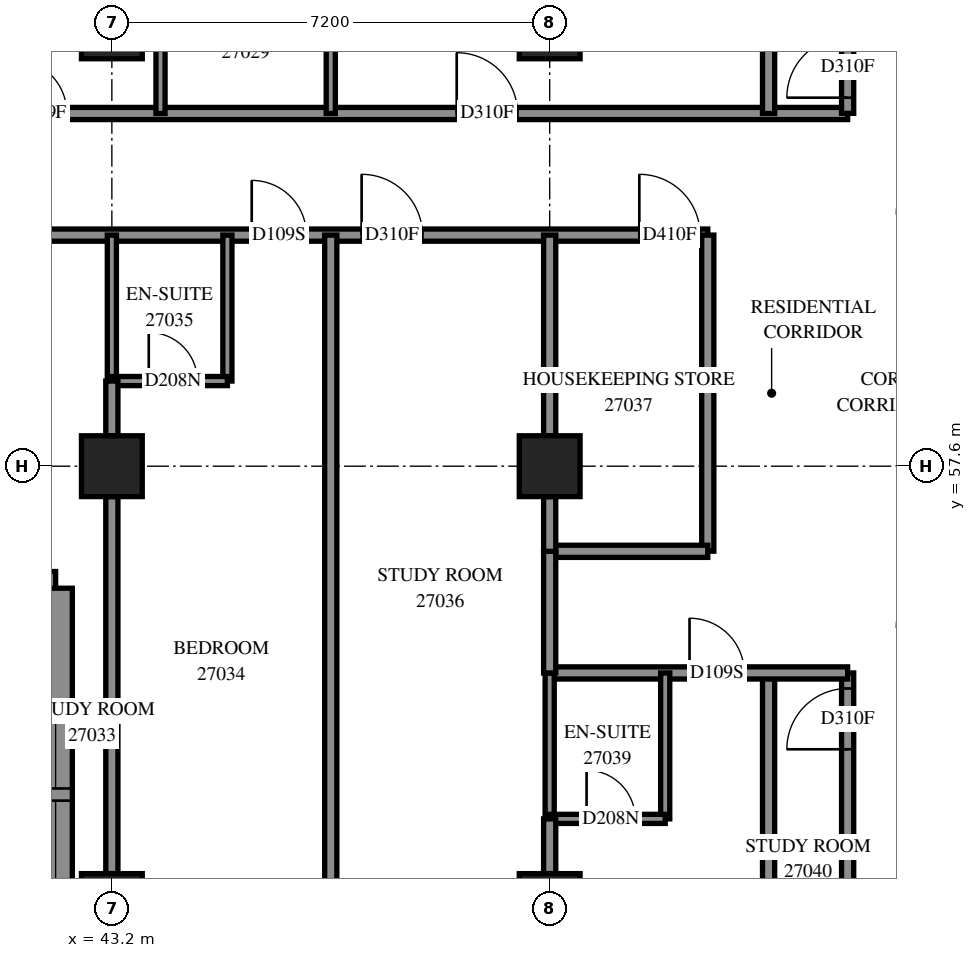
"""IFC4 building model, lengths in metres.
Left out: names, types, materials, properties, quantities, classifications, styles, units other than length and angle.
Written with IfcOpenShell. Run it as: python <this file> out.ifc"""

import sys

from ifc_helpers import new_model, si_unit, direction, frame, frame_2d, origin, origin_2d, place, context, subcontext, project, spatial, polyline, rectangle, outline, extrude, element, fill, save


model = new_model("IFC4")
c1 = context("Model", 3, precision=1e-05, world=origin(), true_north=direction((0.0, 1.0)))
c2 = subcontext(c1, "Body", "Model", "MODEL_VIEW")
j1 = project(units=[si_unit("LENGTHUNIT", "METRE"), si_unit("PLANEANGLEUNIT", "RADIAN")], contexts=[c1])
p1 = place(None, origin())
s1 = spatial("IfcSite", under=j1, at=p1, CompositionType="ELEMENT")
p2 = place(p1, origin())
s2 = spatial("IfcBuilding", under=s1, at=p2, CompositionType="ELEMENT")
p3 = place(p2, frame((0.0, 0.0, 101.6)))
s3 = spatial("IfcBuildingStorey", under=s2, at=p3, CompositionType="ELEMENT", Elevation=101.6)
for number, where, z_axis, x_axis in (
    (1, (43.2, 50.4, 0.0), (0.0, 0.0, 1.0), (1.0, 0.0, 0.0)),
    (2, (43.2, 57.6, 0.0), (0.0, 0.0, 1.0), (1.0, 0.0, 0.0)),
    (3, (43.2, 64.8, 0.0), (0.0, 0.0, 1.0), (1.0, 0.0, 0.0)),
    (4, (50.4, 50.4, 0.0), (0.0, 0.0, 1.0), (1.0, 0.0, 0.0)),
    (5, (50.4, 57.6, 0.0), (0.0, 0.0, 1.0), (1.0, 0.0, 0.0)),
    (6, (50.4, 64.8, 0.0), (0.0, 0.0, 1.0), (1.0, 0.0, 0.0)),
):
    element("IfcColumn", number, at=place(p3, frame(where, z_axis=z_axis, x_axis=x_axis)), inside=s3, PredefinedType="COLUMN", context=c2, shape_type="SweptSolid", body=[
        extrude(rectangle(XDim=1.0, YDim=1.0, at=origin_2d()), origin(), (0.0, 0.0, 1.0), 3.1),
    ])
p4 = place(p3, frame((27.875, 55.593, 0.0), z_axis=(0.0, 0.0, 1.0), x_axis=(1.0, 0.0, 0.0)))
e7 = element("IfcWall", 7, at=p4, inside=s3, PredefinedType="SOLIDWALL", context=c2, shape_type="SweptSolid", body=[
    extrude(outline(polyline([(-0.275, -0.275), (14.125, -0.275), (14.675, 0.275), (0.275, 0.275), (-0.275, -0.275)])), origin(), (0.0, 0.0, 1.0), 3.1),
])
p5 = place(p4, frame((1.175, 0.0, 0.5)))
e8 = element("IfcOpeningElement", 8, at=p5, cuts=e7, PredefinedType="OPENING", context=c2, shape_type="SweptSolid", body=[
    extrude(rectangle(XDim=1.3, YDim=2.45, at=frame_2d((0.65, 1.225))), frame((0.0, 0.285, 0.0), z_axis=(0.0, -1.0, 0.0), x_axis=(1.0, 0.0, 0.0)), (0.0, 0.0, 1.0), 0.57),
])
p6 = place(p4, frame((2.675, 0.0, 0.5)))
e9 = element("IfcOpeningElement", 9, at=p6, cuts=e7, PredefinedType="OPENING", context=c2, shape_type="SweptSolid", body=[
    extrude(rectangle(XDim=1.3, YDim=2.45, at=frame_2d((0.65, 1.225))), frame((0.0, 0.285, 0.0), z_axis=(0.0, -1.0, 0.0), x_axis=(1.0, 0.0, 0.0)), (0.0, 0.0, 1.0), 0.57),
])
p7 = place(p4, frame((4.925, 0.0, 0.5)))
e10 = element("IfcOpeningElement", 10, at=p7, cuts=e7, PredefinedType="OPENING", context=c2, shape_type="SweptSolid", body=[
    extrude(rectangle(XDim=1.3, YDim=2.45, at=frame_2d((0.65, 1.225))), frame((0.0, 0.285, 0.0), z_axis=(0.0, -1.0, 0.0), x_axis=(1.0, 0.0, 0.0)), (0.0, 0.0, 1.0), 0.57),
])
p8 = place(p4, frame((6.425, 0.0, 0.5)))
e11 = element("IfcOpeningElement", 11, at=p8, cuts=e7, PredefinedType="OPENING", context=c2, shape_type="SweptSolid", body=[
    extrude(rectangle(XDim=1.3, YDim=2.45, at=frame_2d((0.65, 1.225))), frame((0.0, 0.285, 0.0), z_axis=(0.0, -1.0, 0.0), x_axis=(1.0, 0.0, 0.0)), (0.0, 0.0, 1.0), 0.57),
])
p9 = place(p4, frame((8.275, 0.0, 0.5)))
e12 = element("IfcOpeningElement", 12, at=p9, cuts=e7, PredefinedType="OPENING", context=c2, shape_type="SweptSolid", body=[
    extrude(rectangle(XDim=1.3, YDim=2.45, at=frame_2d((0.65, 1.225))), frame((0.0, 0.285, 0.0), z_axis=(0.0, -1.0, 0.0), x_axis=(1.0, 0.0, 0.0)), (0.0, 0.0, 1.0), 0.57),
])
p10 = place(p4, frame((9.775, 0.0, 0.5)))
e13 = element("IfcOpeningElement", 13, at=p10, cuts=e7, PredefinedType="OPENING", context=c2, shape_type="SweptSolid", body=[
    extrude(rectangle(XDim=1.3, YDim=2.45, at=frame_2d((0.65, 1.225))), frame((0.0, 0.285, 0.0), z_axis=(0.0, -1.0, 0.0), x_axis=(1.0, 0.0, 0.0)), (0.0, 0.0, 1.0), 0.57),
])
p11 = place(p4, frame((12.363, 0.0, 0.5)))
e14 = element("IfcOpeningElement", 14, at=p11, cuts=e7, PredefinedType="OPENING", context=c2, shape_type="SweptSolid", body=[
    extrude(rectangle(XDim=1.2, YDim=2.45, at=frame_2d((0.6, 1.225))), frame((0.0, 0.285, 0.0), z_axis=(0.0, -1.0, 0.0), x_axis=(1.0, 0.0, 0.0)), (0.0, 0.0, 1.0), 0.57),
])
p12 = place(p3, frame((42.275, 55.593, 0.0), z_axis=(0.0, 0.0, 1.0), x_axis=(0.0, -1.0, 0.0)))
e15 = element("IfcWall", 15, at=p12, inside=s3, PredefinedType="SOLIDWALL", context=c2, shape_type="SweptSolid", body=[
    extrude(outline(polyline([(0.275, -0.275), (6.393, -0.275), (5.843, 0.275), (-0.275, 0.275), (0.275, -0.275)])), origin(), (0.0, 0.0, 1.0), 3.1),
])
p13 = place(p12, frame((1.993, 0.0, 0.5)))
e16 = element("IfcOpeningElement", 16, at=p13, cuts=e15, PredefinedType="OPENING", context=c2, shape_type="SweptSolid", body=[
    extrude(rectangle(XDim=1.3, YDim=2.45, at=frame_2d((0.65, 1.225))), frame((0.0, 0.285, 0.0), z_axis=(0.0, -1.0, 0.0), x_axis=(1.0, 0.0, 0.0)), (0.0, 0.0, 1.0), 0.57),
])
p14 = place(p12, frame((3.493, 0.0, 0.5)))
e17 = element("IfcOpeningElement", 17, at=p14, cuts=e15, PredefinedType="OPENING", context=c2, shape_type="SweptSolid", body=[
    extrude(rectangle(XDim=1.3, YDim=2.45, at=frame_2d((0.65, 1.225))), frame((0.0, 0.285, 0.0), z_axis=(0.0, -1.0, 0.0), x_axis=(1.0, 0.0, 0.0)), (0.0, 0.0, 1.0), 0.57),
])
p15 = place(p3, frame((28.8, 61.4, 0.0), z_axis=(0.0, 0.0, 1.0), x_axis=(1.0, 0.0, 0.0)))
e18 = element("IfcWall", 18, at=p15, inside=s3, PredefinedType="PARTITIONING", context=c2, shape_type="SweptSolid", body=[
    extrude(rectangle(XDim=24.2, YDim=0.2, at=frame_2d((12.1, 0.0))), origin(), (0.0, 0.0, 1.0), 3.1),
])
p16 = place(p15, frame((2.3, 0.0, 0.0)))
e19 = element("IfcOpeningElement", 19, at=p16, cuts=e18, PredefinedType="OPENING", context=c2, shape_type="SweptSolid", body=[
    extrude(rectangle(XDim=0.9, YDim=2.1, at=frame_2d((0.45, 1.05))), frame((0.0, 0.11, 0.0), z_axis=(0.0, -1.0, 0.0), x_axis=(1.0, 0.0, 0.0)), (0.0, 0.0, 1.0), 0.22),
])
p17 = place(p15, frame((5.901, 0.0, 0.0)))
e20 = element("IfcOpeningElement", 20, at=p17, cuts=e18, PredefinedType="OPENING", context=c2, shape_type="SweptSolid", body=[
    extrude(rectangle(XDim=0.9, YDim=2.1, at=frame_2d((0.45, 1.05))), frame((0.0, 0.11, 0.0), z_axis=(0.0, -1.0, 0.0), x_axis=(1.0, 0.0, 0.0)), (0.0, 0.0, 1.0), 0.22),
])
p18 = place(p15, frame((11.307, 0.0, 0.0)))
e21 = element("IfcOpeningElement", 21, at=p18, cuts=e18, PredefinedType="OPENING", context=c2, shape_type="SweptSolid", body=[
    extrude(rectangle(XDim=1.0, YDim=2.1, at=frame_2d((0.5, 1.05))), frame((0.0, 0.11, 0.0), z_axis=(0.0, -1.0, 0.0), x_axis=(1.0, 0.0, 0.0)), (0.0, 0.0, 1.0), 0.22),
])
p19 = place(p15, frame((16.7, 0.0, 0.0)))
e22 = element("IfcOpeningElement", 22, at=p19, cuts=e18, PredefinedType="OPENING", context=c2, shape_type="SweptSolid", body=[
    extrude(rectangle(XDim=0.9, YDim=2.1, at=frame_2d((0.45, 1.05))), frame((0.0, 0.11, 0.0), z_axis=(0.0, -1.0, 0.0), x_axis=(1.0, 0.0, 0.0)), (0.0, 0.0, 1.0), 0.22),
])
p20 = place(p15, frame((18.508, 0.0, 0.0)))
e23 = element("IfcOpeningElement", 23, at=p20, cuts=e18, PredefinedType="OPENING", context=c2, shape_type="SweptSolid", body=[
    extrude(rectangle(XDim=1.0, YDim=2.1, at=frame_2d((0.5, 1.05))), frame((0.0, 0.11, 0.0), z_axis=(0.0, -1.0, 0.0), x_axis=(1.0, 0.0, 0.0)), (0.0, 0.0, 1.0), 0.22),
])
p21 = place(p15, frame((23.074, 0.0, 0.0)))
e24 = element("IfcOpeningElement", 24, at=p21, cuts=e18, PredefinedType="OPENING", context=c2, shape_type="SweptSolid", body=[
    extrude(rectangle(XDim=1.0, YDim=2.1, at=frame_2d((0.5, 1.05))), frame((0.0, 0.11, 0.0), z_axis=(0.0, -1.0, 0.0), x_axis=(1.0, 0.0, 0.0)), (0.0, 0.0, 1.0), 0.22),
])
p22 = place(p3, frame((33.4, 63.4, 0.0), z_axis=(0.0, 0.0, 1.0), x_axis=(1.0, 0.0, 0.0)))
e25 = element("IfcWall", 25, at=p22, inside=s3, PredefinedType="PARTITIONING", context=c2, shape_type="SweptSolid", body=[
    extrude(rectangle(XDim=21.9, YDim=0.2, at=frame_2d((10.95, 0.0))), origin(), (0.0, 0.0, 1.0), 3.1),
])
p23 = place(p22, frame((3.152, 0.0, 0.0)))
e26 = element("IfcOpeningElement", 26, at=p23, cuts=e25, PredefinedType="OPENING", context=c2, shape_type="SweptSolid", body=[
    extrude(rectangle(XDim=0.9, YDim=2.1, at=frame_2d((0.45, 1.05))), frame((0.0, 0.11, 0.0), z_axis=(0.0, -1.0, 0.0), x_axis=(1.0, 0.0, 0.0)), (0.0, 0.0, 1.0), 0.22),
])
p24 = place(p22, frame((8.161, 0.0, 0.0)))
e27 = element("IfcOpeningElement", 27, at=p24, cuts=e25, PredefinedType="OPENING", context=c2, shape_type="SweptSolid", body=[
    extrude(rectangle(XDim=0.9, YDim=2.1, at=frame_2d((0.45, 1.05))), frame((0.0, 0.11, 0.0), z_axis=(0.0, -1.0, 0.0), x_axis=(1.0, 0.0, 0.0)), (0.0, 0.0, 1.0), 0.22),
])
p25 = place(p22, frame((15.471, 0.0, 0.0)))
e28 = element("IfcOpeningElement", 28, at=p25, cuts=e25, PredefinedType="OPENING", context=c2, shape_type="SweptSolid", body=[
    extrude(rectangle(XDim=1.0, YDim=2.1, at=frame_2d((0.5, 1.05))), frame((0.0, 0.11, 0.0), z_axis=(0.0, -1.0, 0.0), x_axis=(1.0, 0.0, 0.0)), (0.0, 0.0, 1.0), 0.22),
])
p26 = place(p3, frame((54.0, 42.36, 0.0), z_axis=(0.0, 0.0, 1.0), x_axis=(0.0, 1.0, 0.0)))
e29 = element("IfcWall", 29, at=p26, inside=s3, PredefinedType="PARTITIONING", context=c2, shape_type="SweptSolid", body=[
    extrude(rectangle(XDim=11.84, YDim=0.2, at=frame_2d((5.92, 0.0))), origin(), (0.0, 0.0, 1.0), 3.1),
])
p27 = place(p3, frame((46.8, 49.75, 0.0), z_axis=(0.0, 0.0, 1.0), x_axis=(0.0, 1.0, 0.0)))
e30 = element("IfcWall", 30, at=p27, inside=s3, PredefinedType="PARTITIONING", context=c2, shape_type="SweptSolid", body=[
    extrude(rectangle(XDim=11.65, YDim=0.2, at=frame_2d((5.825, 0.0))), origin(), (0.0, 0.0, 1.0), 3.1),
])
p28 = place(p3, frame((54.0, 63.4, 0.0), z_axis=(0.0, 0.0, 1.0), x_axis=(0.0, 1.0, 0.0)))
e31 = element("IfcWall", 31, at=p28, inside=s3, PredefinedType="PARTITIONING", context=c2, shape_type="SweptSolid", body=[
    extrude(rectangle(XDim=9.305, YDim=0.2, at=frame_2d((4.652, 0.0))), origin(), (0.0, 0.0, 1.0), 3.1),
])
p29 = place(p3, frame((43.2, 50.9, 0.0), z_axis=(0.0, 0.0, 1.0), x_axis=(0.0, 1.0, 0.0)))
e32 = element("IfcWall", 32, at=p29, inside=s3, PredefinedType="PARTITIONING", context=c2, shape_type="SweptSolid", body=[
    extrude(rectangle(XDim=6.2, YDim=0.2, at=frame_2d((3.1, 0.0))), origin(), (0.0, 0.0, 1.0), 2.6),
])
p30 = place(p3, frame((55.3, 48.1, 0.0), z_axis=(0.0, 0.0, 1.0), x_axis=(0.0, 1.0, 0.0)))
e33 = element("IfcWall", 33, at=p30, inside=s3, PredefinedType="PARTITIONING", context=c2, shape_type="SweptSolid", body=[
    extrude(rectangle(XDim=6.1, YDim=0.2, at=frame_2d((3.05, 0.0))), origin(), (0.0, 0.0, 1.0), 3.1),
])
p31 = place(p30, frame((4.845, 0.0, 0.0)))
e34 = element("IfcOpeningElement", 34, at=p31, cuts=e33, PredefinedType="OPENING", context=c2, shape_type="SweptSolid", body=[
    extrude(rectangle(XDim=1.0, YDim=2.1, at=frame_2d((0.5, 1.05))), frame((0.0, 0.11, 0.0), z_axis=(0.0, -1.0, 0.0), x_axis=(1.0, 0.0, 0.0)), (0.0, 0.0, 1.0), 0.22),
])
p32 = place(p3, frame((53.0, 56.202, 0.0), z_axis=(0.0, 0.0, 1.0), x_axis=(0.0, 1.0, 0.0)))
e35 = element("IfcWall", 35, at=p32, inside=s3, PredefinedType="PARTITIONING", context=c2, shape_type="SweptSolid", body=[
    extrude(rectangle(XDim=5.198, YDim=0.2, at=frame_2d((2.599, 0.0))), origin(), (0.0, 0.0, 1.0), 3.1),
])
p33 = place(p3, frame((50.4, 54.2, 0.0), z_axis=(0.0, 0.0, 1.0), x_axis=(1.0, 0.0, 0.0)))
e36 = element("IfcWall", 36, at=p33, inside=s3, PredefinedType="PARTITIONING", context=c2, shape_type="SweptSolid", body=[
    extrude(rectangle(XDim=4.9, YDim=0.2, at=frame_2d((2.45, 0.0))), origin(), (0.0, 0.0, 1.0), 3.1),
])
p34 = place(p33, frame((2.3, 0.0, 0.0)))
e37 = element("IfcOpeningElement", 37, at=p34, cuts=e36, PredefinedType="OPENING", context=c2, shape_type="SweptSolid", body=[
    extrude(rectangle(XDim=0.9, YDim=2.1, at=frame_2d((0.45, 1.05))), frame((0.0, 0.11, 0.0), z_axis=(0.0, -1.0, 0.0), x_axis=(1.0, 0.0, 0.0)), (0.0, 0.0, 1.0), 0.22),
])
p35 = place(p3, frame((55.3, 63.402, 0.0), z_axis=(0.0, 0.0, 1.0), x_axis=(0.0, 1.0, 0.0)))
e38 = element("IfcWall", 38, at=p35, inside=s3, PredefinedType="PARTITIONING", context=c2, shape_type="SweptSolid", body=[
    extrude(rectangle(XDim=3.698, YDim=0.2, at=frame_2d((1.849, 0.0))), origin(), (0.0, 0.0, 1.0), 3.1),
])
p36 = place(p35, frame((0.258, 0.0, 0.0)))
e39 = element("IfcOpeningElement", 39, at=p36, cuts=e38, PredefinedType="OPENING", context=c2, shape_type="SweptSolid", body=[
    extrude(rectangle(XDim=1.0, YDim=2.1, at=frame_2d((0.5, 1.05))), frame((0.0, 0.11, 0.0), z_axis=(0.0, -1.0, 0.0), x_axis=(1.0, 0.0, 0.0)), (0.0, 0.0, 1.0), 0.22),
])
p37 = place(p3, frame((50.4, 58.1, 0.0), z_axis=(0.0, 0.0, 1.0), x_axis=(0.0, 1.0, 0.0)))
e40 = element("IfcWall", 40, at=p37, inside=s3, PredefinedType="PARTITIONING", context=c2, shape_type="SweptSolid", body=[
    extrude(rectangle(XDim=3.3, YDim=0.2, at=frame_2d((1.65, 0.0))), origin(), (0.0, 0.0, 1.0), 3.1),
])
p38 = place(p3, frame((50.4, 56.2, 0.0), z_axis=(0.0, 0.0, 1.0), x_axis=(1.0, 0.0, 0.0)))
e41 = element("IfcWall", 41, at=p38, inside=s3, PredefinedType="PARTITIONING", context=c2, shape_type="SweptSolid", body=[
    extrude(rectangle(XDim=2.6, YDim=0.2, at=frame_2d((1.3, 0.0))), origin(), (0.0, 0.0, 1.0), 3.1),
])
for number, where, z_axis, x_axis in (
    (42, (52.3, 51.8, 0.0), (0.0, 0.0, 1.0), (0.0, 1.0, 0.0)),
    (43, (50.4, 51.8, 0.0), (0.0, 0.0, 1.0), (0.0, 1.0, 0.0)),
    (44, (45.1, 59.0, 0.0), (0.0, 0.0, 1.0), (0.0, 1.0, 0.0)),
    (45, (43.2, 59.0, 0.0), (0.0, 0.0, 1.0), (0.0, 1.0, 0.0)),
    (46, (44.0, 63.4, 0.0), (0.0, 0.0, 1.0), (0.0, 1.0, 0.0)),
    (47, (46.8, 63.4, 0.0), (0.0, 0.0, 1.0), (0.0, 1.0, 0.0)),
):
    element("IfcWall", number, at=place(p3, frame(where, z_axis=z_axis, x_axis=x_axis)), inside=s3, PredefinedType="PARTITIONING", context=c2, shape_type="SweptSolid", body=[
        extrude(rectangle(XDim=2.4, YDim=0.15, at=frame_2d((1.2, 0.0))), origin(), (0.0, 0.0, 1.0), 3.1),
    ])
p39 = place(p3, frame((50.4, 54.2, 0.0), z_axis=(0.0, 0.0, 1.0), x_axis=(0.0, 1.0, 0.0)))
e48 = element("IfcWall", 48, at=p39, inside=s3, PredefinedType="PARTITIONING", context=c2, shape_type="SweptSolid", body=[
    extrude(rectangle(XDim=2.0, YDim=0.2, at=frame_2d((1.0, 0.0))), origin(), (0.0, 0.0, 1.0), 3.1),
])
p40 = place(p3, frame((43.2, 59.0, 0.0), z_axis=(0.0, 0.0, 1.0), x_axis=(1.0, 0.0, 0.0)))
e49 = element("IfcWall", 49, at=p40, inside=s3, PredefinedType="PARTITIONING", context=c2, shape_type="SweptSolid", body=[
    extrude(rectangle(XDim=1.9, YDim=0.15, at=frame_2d((0.95, 0.0))), origin(), (0.0, 0.0, 1.0), 3.1),
])
p41 = place(p40, frame((0.607, 0.0, 0.0)))
e50 = element("IfcOpeningElement", 50, at=p41, cuts=e49, PredefinedType="OPENING", context=c2, shape_type="SweptSolid", body=[
    extrude(rectangle(XDim=0.8, YDim=2.1, at=frame_2d((0.4, 1.05))), frame((0.0, 0.085, 0.0), z_axis=(0.0, -1.0, 0.0), x_axis=(1.0, 0.0, 0.0)), (0.0, 0.0, 1.0), 0.17),
])
p42 = place(p3, frame((50.4, 51.8, 0.0), z_axis=(0.0, 0.0, 1.0), x_axis=(1.0, 0.0, 0.0)))
e51 = element("IfcWall", 51, at=p42, inside=s3, PredefinedType="PARTITIONING", context=c2, shape_type="SweptSolid", body=[
    extrude(rectangle(XDim=1.9, YDim=0.15, at=frame_2d((0.95, 0.0))), origin(), (0.0, 0.0, 1.0), 3.1),
])
p43 = place(p42, frame((0.607, 0.0, 0.0)))
e52 = element("IfcOpeningElement", 52, at=p43, cuts=e51, PredefinedType="OPENING", context=c2, shape_type="SweptSolid", body=[
    extrude(rectangle(XDim=0.8, YDim=2.1, at=frame_2d((0.4, 1.05))), frame((0.0, 0.085, 0.0), z_axis=(0.0, -1.0, 0.0), x_axis=(1.0, 0.0, 0.0)), (0.0, 0.0, 1.0), 0.17),
])
for number, where, z_axis, x_axis in (
    (53, (43.2, 58.1, 0.0), (0.0, 0.0, 1.0), (0.0, 1.0, 0.0)),
    (54, (50.4, 50.9, 0.0), (0.0, 0.0, 1.0), (0.0, 1.0, 0.0)),
    (55, (50.4, 56.2, 0.0), (0.0, 0.0, 1.0), (0.0, 1.0, 0.0)),
):
    element("IfcWall", number, at=place(p3, frame(where, z_axis=z_axis, x_axis=x_axis)), inside=s3, PredefinedType="PARTITIONING", context=c2, shape_type="SweptSolid", body=[
        extrude(rectangle(XDim=0.9, YDim=0.2, at=frame_2d((0.45, 0.0))), origin(), (0.0, 0.0, 1.0), 3.1),
    ])
p44 = place(p13, origin())
e56 = element("IfcWindow", 56, at=p44, inside=s3, PartitioningType="SINGLE_PANEL", PredefinedType="WINDOW", context=c2, shape_type="SweptSolid", body=[
    extrude(rectangle(XDim=1.3, YDim=2.45, at=frame_2d((0.65, 1.225))), frame((0.0, 0.155, 0.0), z_axis=(0.0, -1.0, 0.0), x_axis=(1.0, 0.0, 0.0)), (0.0, 0.0, 1.0), 0.06),
])
fill(e16, e56)
p45 = place(p14, origin())
e57 = element("IfcWindow", 57, at=p45, inside=s3, PartitioningType="SINGLE_PANEL", PredefinedType="WINDOW", context=c2, shape_type="SweptSolid", body=[
    extrude(rectangle(XDim=1.3, YDim=2.45, at=frame_2d((0.65, 1.225))), frame((0.0, 0.155, 0.0), z_axis=(0.0, -1.0, 0.0), x_axis=(1.0, 0.0, 0.0)), (0.0, 0.0, 1.0), 0.06),
])
fill(e17, e57)
p46 = place(p24, origin())
e58 = element("IfcDoor", 58, at=p46, inside=s3, OperationType="SINGLE_SWING_LEFT", PredefinedType="DOOR", context=c2, shape_type="SweptSolid", body=[
    extrude(rectangle(XDim=0.9, YDim=2.1, at=frame_2d((0.45, 1.05))), frame((0.0, 0.025, 0.0), z_axis=(0.0, -1.0, 0.0), x_axis=(1.0, 0.0, 0.0)), (0.0, 0.0, 1.0), 0.05),
])
fill(e27, e58)
p47 = place(p25, origin())
e59 = element("IfcDoor", 59, at=p47, inside=s3, OperationType="SINGLE_SWING_LEFT", PredefinedType="DOOR", context=c2, shape_type="SweptSolid", body=[
    extrude(rectangle(XDim=1.0, YDim=2.1, at=frame_2d((0.5, 1.05))), frame((0.0, 0.025, 0.0), z_axis=(0.0, -1.0, 0.0), x_axis=(1.0, 0.0, 0.0)), (0.0, 0.0, 1.0), 0.05),
])
fill(e28, e59)
p48 = place(p36, origin())
e60 = element("IfcDoor", 60, at=p48, inside=s3, OperationType="SINGLE_SWING_LEFT", PredefinedType="DOOR", context=c2, shape_type="SweptSolid", body=[
    extrude(rectangle(XDim=1.0, YDim=2.1, at=frame_2d((0.5, 1.05))), frame((0.0, 0.025, 0.0), z_axis=(0.0, -1.0, 0.0), x_axis=(1.0, 0.0, 0.0)), (0.0, 0.0, 1.0), 0.05),
])
fill(e39, e60)
p49 = place(p19, origin())
e61 = element("IfcDoor", 61, at=p49, inside=s3, OperationType="SINGLE_SWING_LEFT", PredefinedType="DOOR", context=c2, shape_type="SweptSolid", body=[
    extrude(rectangle(XDim=0.9, YDim=2.1, at=frame_2d((0.45, 1.05))), frame((0.0, 0.025, 0.0), z_axis=(0.0, -1.0, 0.0), x_axis=(1.0, 0.0, 0.0)), (0.0, 0.0, 1.0), 0.05),
])
fill(e22, e61)
p50 = place(p41, origin())
e62 = element("IfcDoor", 62, at=p50, inside=s3, OperationType="SINGLE_SWING_RIGHT", PredefinedType="DOOR", context=c2, shape_type="SweptSolid", body=[
    extrude(rectangle(XDim=0.8, YDim=2.1, at=frame_2d((0.4, 1.05))), frame((0.0, 0.025, 0.0), z_axis=(0.0, -1.0, 0.0), x_axis=(1.0, 0.0, 0.0)), (0.0, 0.0, 1.0), 0.05),
])
fill(e50, e62)
p51 = place(p20, origin())
e63 = element("IfcDoor", 63, at=p51, inside=s3, OperationType="SINGLE_SWING_RIGHT", PredefinedType="DOOR", context=c2, shape_type="SweptSolid", body=[
    extrude(rectangle(XDim=1.0, YDim=2.1, at=frame_2d((0.5, 1.05))), frame((0.0, 0.025, 0.0), z_axis=(0.0, -1.0, 0.0), x_axis=(1.0, 0.0, 0.0)), (0.0, 0.0, 1.0), 0.05),
])
fill(e23, e63)
p52 = place(p21, origin())
e64 = element("IfcDoor", 64, at=p52, inside=s3, OperationType="SINGLE_SWING_LEFT", PredefinedType="DOOR", context=c2, shape_type="SweptSolid", body=[
    extrude(rectangle(XDim=1.0, YDim=2.1, at=frame_2d((0.5, 1.05))), frame((0.0, 0.025, 0.0), z_axis=(0.0, -1.0, 0.0), x_axis=(1.0, 0.0, 0.0)), (0.0, 0.0, 1.0), 0.05),
])
fill(e24, e64)
p53 = place(p34, origin())
e65 = element("IfcDoor", 65, at=p53, inside=s3, OperationType="SINGLE_SWING_LEFT", PredefinedType="DOOR", context=c2, shape_type="SweptSolid", body=[
    extrude(rectangle(XDim=0.9, YDim=2.1, at=frame_2d((0.45, 1.05))), frame((0.0, 0.025, 0.0), z_axis=(0.0, -1.0, 0.0), x_axis=(1.0, 0.0, 0.0)), (0.0, 0.0, 1.0), 0.05),
])
fill(e37, e65)
p54 = place(p43, origin())
e66 = element("IfcDoor", 66, at=p54, inside=s3, OperationType="SINGLE_SWING_RIGHT", PredefinedType="DOOR", context=c2, shape_type="SweptSolid", body=[
    extrude(rectangle(XDim=0.8, YDim=2.1, at=frame_2d((0.4, 1.05))), frame((0.0, 0.025, 0.0), z_axis=(0.0, -1.0, 0.0), x_axis=(1.0, 0.0, 0.0)), (0.0, 0.0, 1.0), 0.05),
])
fill(e52, e66)
p55 = place(p31, origin())
e67 = element("IfcDoor", 67, at=p55, inside=s3, OperationType="SINGLE_SWING_RIGHT", PredefinedType="DOOR", context=c2, shape_type="SweptSolid", body=[
    extrude(rectangle(XDim=1.0, YDim=2.1, at=frame_2d((0.5, 1.05))), frame((0.0, 0.025, 0.0), z_axis=(0.0, -1.0, 0.0), x_axis=(1.0, 0.0, 0.0)), (0.0, 0.0, 1.0), 0.05),
])
fill(e34, e67)
save(model, sys.argv[1])
